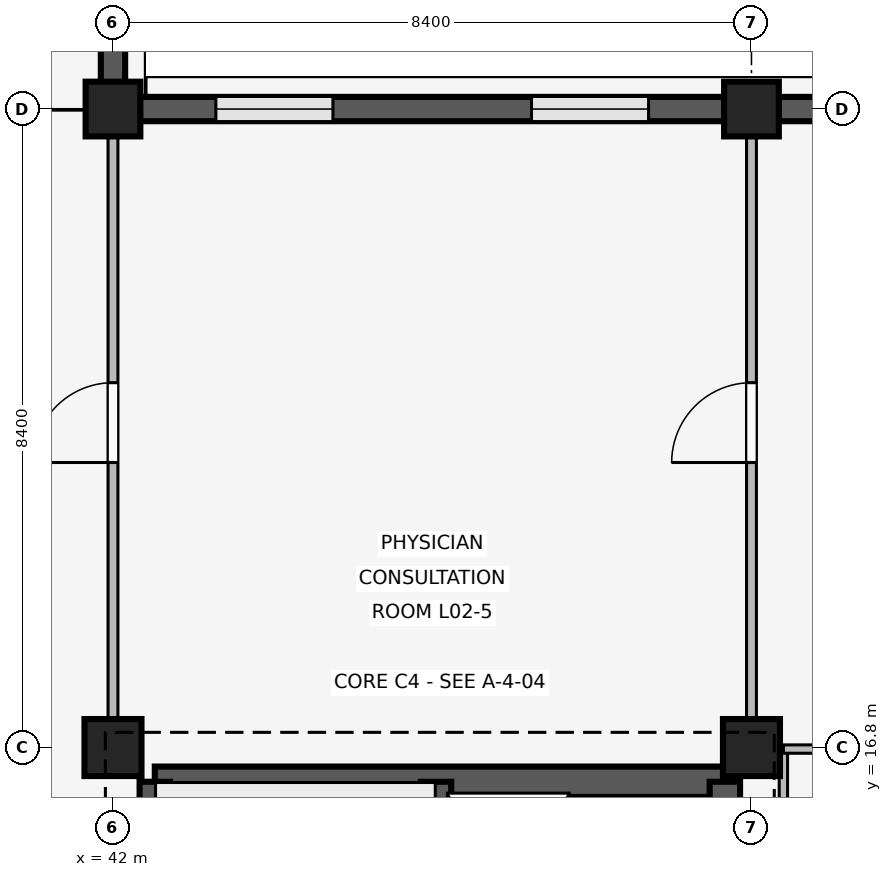
"""IFC4 building model, lengths in metres.
Left out: names, types, materials, properties, quantities, classifications, styles, units other than length and angle.
Written with IfcOpenShell. Run it as: python <this file> out.ifc"""

import sys

from ifc_helpers import new_model, si_unit, direction, frame, frame_2d, origin, origin_2d, place, context, subcontext, project, spatial, rectangle, extrude, element, fill, save


model = new_model("IFC4")
c1 = context("Model", 3, precision=1e-05, world=origin(), true_north=direction((0.0, 1.0)))
c2 = subcontext(c1, "Body", "Model", "MODEL_VIEW")
j1 = project(units=[si_unit("LENGTHUNIT", "METRE"), si_unit("PLANEANGLEUNIT", "RADIAN")], contexts=[c1])
p1 = place(None, origin())
s1 = spatial("IfcSite", under=j1, at=p1, CompositionType="ELEMENT")
p2 = place(p1, origin())
s2 = spatial("IfcBuilding", under=s1, at=p2, CompositionType="ELEMENT")
p3 = place(p2, frame((0.0, 0.0, 8.1)))
s3 = spatial("IfcBuildingStorey", under=s2, at=p3, CompositionType="ELEMENT", Elevation=8.1)
p4 = place(p3, frame((42.0, 16.8, 0.0), z_axis=(0.0, 0.0, 1.0), x_axis=(1.0, 0.0, 0.0)))
e1 = element("IfcColumn", 1, at=p4, inside=s3, PredefinedType="COLUMN", context=c2, shape_type="SweptSolid", body=[
    extrude(rectangle(XDim=0.75, YDim=0.75, at=origin_2d()), origin(), (0.0, 0.0, 1.0), 4.8),
])
p5 = place(p3, frame((42.0, 25.2, 0.0), z_axis=(0.0, 0.0, 1.0), x_axis=(1.0, 0.0, 0.0)))
e2 = element("IfcColumn", 2, at=p5, inside=s3, PredefinedType="COLUMN", context=c2, shape_type="SweptSolid", body=[
    extrude(rectangle(XDim=0.72, YDim=0.72, at=origin_2d()), origin(), (0.0, 0.0, 1.0), 4.8),
])
p6 = place(p3, frame((50.4, 16.8, 0.0), z_axis=(0.0, 0.0, 1.0), x_axis=(1.0, 0.0, 0.0)))
e3 = element("IfcColumn", 3, at=p6, inside=s3, PredefinedType="COLUMN", context=c2, shape_type="SweptSolid", body=[
    extrude(rectangle(XDim=0.75, YDim=0.75, at=origin_2d()), origin(), (0.0, 0.0, 1.0), 4.8),
])
p7 = place(p3, frame((50.4, 25.2, 0.0), z_axis=(0.0, 0.0, 1.0), x_axis=(1.0, 0.0, 0.0)))
e4 = element("IfcColumn", 4, at=p7, inside=s3, PredefinedType="COLUMN", context=c2, shape_type="SweptSolid", body=[
    extrude(rectangle(XDim=0.72, YDim=0.72, at=origin_2d()), origin(), (0.0, 0.0, 1.0), 4.8),
])
p8 = place(p3, frame((42.0, 33.245, 0.0), z_axis=(0.0, 0.0, 1.0), x_axis=(0.0, -1.0, 0.0)))
e5 = element("IfcWall", 5, at=p8, inside=s3, PredefinedType="SOLIDWALL", context=c2, shape_type="SweptSolid", body=[
    extrude(rectangle(XDim=7.69, YDim=0.32, at=frame_2d((3.845, 0.0))), origin(), (0.0, 0.0, 1.0), 3.86),
])
p9 = place(p8, frame((1.079, 0.0, 0.85)))
e6 = element("IfcOpeningElement", 6, at=p9, cuts=e5, PredefinedType="OPENING", context=c2, shape_type="SweptSolid", body=[
    extrude(rectangle(XDim=1.38, YDim=1.5, at=frame_2d((0.69, 0.75))), frame((0.0, 0.17, 0.0), z_axis=(0.0, -1.0, 0.0), x_axis=(1.0, 0.0, 0.0)), (0.0, 0.0, 1.0), 0.34),
])
p10 = place(p8, frame((5.231, 0.0, 0.85)))
e7 = element("IfcOpeningElement", 7, at=p10, cuts=e5, PredefinedType="OPENING", context=c2, shape_type="SweptSolid", body=[
    extrude(rectangle(XDim=1.38, YDim=1.5, at=frame_2d((0.69, 0.75))), frame((0.0, 0.17, 0.0), z_axis=(0.0, -1.0, 0.0), x_axis=(1.0, 0.0, 0.0)), (0.0, 0.0, 1.0), 0.34),
])
p11 = place(p3, frame((42.355, 25.2, 0.0), z_axis=(0.0, 0.0, 1.0), x_axis=(1.0, 0.0, 0.0)))
e8 = element("IfcWall", 8, at=p11, inside=s3, PredefinedType="SOLIDWALL", context=c2, shape_type="SweptSolid", body=[
    extrude(rectangle(XDim=7.69, YDim=0.32, at=frame_2d((3.845, 0.0))), origin(), (0.0, 0.0, 1.0), 3.86),
])
p12 = place(p11, frame((0.999, 0.0, 0.85)))
e9 = element("IfcOpeningElement", 9, at=p12, cuts=e8, PredefinedType="OPENING", context=c2, shape_type="SweptSolid", body=[
    extrude(rectangle(XDim=1.54, YDim=1.85, at=frame_2d((0.77, 0.925))), frame((0.0, 0.17, 0.0), z_axis=(0.0, -1.0, 0.0), x_axis=(1.0, 0.0, 0.0)), (0.0, 0.0, 1.0), 0.34),
])
p13 = place(p11, frame((5.151, 0.0, 0.85)))
e10 = element("IfcOpeningElement", 10, at=p13, cuts=e8, PredefinedType="OPENING", context=c2, shape_type="SweptSolid", body=[
    extrude(rectangle(XDim=1.54, YDim=1.85, at=frame_2d((0.77, 0.925))), frame((0.0, 0.17, 0.0), z_axis=(0.0, -1.0, 0.0), x_axis=(1.0, 0.0, 0.0)), (0.0, 0.0, 1.0), 0.34),
])
p14 = place(p3, frame((50.755, 25.2, 0.0), z_axis=(0.0, 0.0, 1.0), x_axis=(1.0, 0.0, 0.0)))
e11 = element("IfcWall", 11, at=p14, inside=s3, PredefinedType="SOLIDWALL", context=c2, shape_type="SweptSolid", body=[
    extrude(rectangle(XDim=7.69, YDim=0.32, at=frame_2d((3.845, 0.0))), origin(), (0.0, 0.0, 1.0), 3.86),
])
p15 = place(p14, frame((0.929, 0.0, 0.85)))
e12 = element("IfcOpeningElement", 12, at=p15, cuts=e11, PredefinedType="OPENING", context=c2, shape_type="SweptSolid", body=[
    extrude(rectangle(XDim=1.68, YDim=2.05, at=frame_2d((0.84, 1.025))), frame((0.0, 0.17, 0.0), z_axis=(0.0, -1.0, 0.0), x_axis=(1.0, 0.0, 0.0)), (0.0, 0.0, 1.0), 0.34),
])
p16 = place(p14, frame((5.081, 0.0, 0.85)))
e13 = element("IfcOpeningElement", 13, at=p16, cuts=e11, PredefinedType="OPENING", context=c2, shape_type="SweptSolid", body=[
    extrude(rectangle(XDim=1.68, YDim=2.05, at=frame_2d((0.84, 1.025))), frame((0.0, 0.17, 0.0), z_axis=(0.0, -1.0, 0.0), x_axis=(1.0, 0.0, 0.0)), (0.0, 0.0, 1.0), 0.34),
])
p17 = place(p3, frame((42.55, 16.35, 0.0), z_axis=(0.0, 0.0, 1.0), x_axis=(1.0, 0.0, 0.0)))
e14 = element("IfcWall", 14, at=p17, inside=s3, PredefinedType="SHEAR", context=c2, shape_type="SweptSolid", body=[
    extrude(rectangle(XDim=7.5, YDim=0.4, at=frame_2d((3.75, 0.0))), origin(), (0.0, 0.0, 1.0), 4.52),
])
p18 = place(p3, frame((42.55, 8.8, 0.0), z_axis=(0.0, 0.0, 1.0), x_axis=(0.0, 1.0, 0.0)))
e15 = element("IfcWall", 15, at=p18, inside=s3, PredefinedType="SHEAR", context=c2, shape_type="SweptSolid", body=[
    extrude(rectangle(XDim=7.55, YDim=0.4, at=frame_2d((3.775, 0.0))), origin(), (0.0, 0.0, 1.0), 4.52),
])
p19 = place(p18, frame((0.28, 0.0, 0.0)))
e16 = element("IfcOpeningElement", 16, at=p19, cuts=e15, PredefinedType="OPENING", context=c2, shape_type="SweptSolid", body=[
    extrude(rectangle(XDim=1.0, YDim=2.15, at=frame_2d((0.5, 1.075))), frame((0.0, 0.21, 0.0), z_axis=(0.0, -1.0, 0.0), x_axis=(1.0, 0.0, 0.0)), (0.0, 0.0, 1.0), 0.42),
])
p20 = place(p3, frame((50.05, 8.8, 0.0), z_axis=(0.0, 0.0, 1.0), x_axis=(0.0, 1.0, 0.0)))
e17 = element("IfcWall", 17, at=p20, inside=s3, PredefinedType="SHEAR", context=c2, shape_type="SweptSolid", body=[
    extrude(rectangle(XDim=7.55, YDim=0.4, at=frame_2d((3.775, 0.0))), origin(), (0.0, 0.0, 1.0), 4.52),
])
p21 = place(p20, frame((2.4, 0.0, 0.0)))
e18 = element("IfcOpeningElement", 18, at=p21, cuts=e17, PredefinedType="OPENING", context=c2, shape_type="SweptSolid", body=[
    extrude(rectangle(XDim=1.2, YDim=2.2, at=frame_2d((0.6, 1.1))), frame((0.0, 0.21, 0.0), z_axis=(0.0, -1.0, 0.0), x_axis=(1.0, 0.0, 0.0)), (0.0, 0.0, 1.0), 0.42),
])
p22 = place(p3, frame((46.25, 8.8, 0.0), z_axis=(0.0, 0.0, 1.0), x_axis=(0.0, 1.0, 0.0)))
e19 = element("IfcWall", 19, at=p22, inside=s3, PredefinedType="SHEAR", context=c2, shape_type="SweptSolid", body=[
    extrude(rectangle(XDim=7.55, YDim=0.4, at=frame_2d((3.775, 0.0))), origin(), (0.0, 0.0, 1.0), 4.52),
])
p23 = place(p22, frame((0.28, 0.0, 0.0)))
e20 = element("IfcOpeningElement", 20, at=p23, cuts=e19, PredefinedType="OPENING", context=c2, shape_type="SweptSolid", body=[
    extrude(rectangle(XDim=1.0, YDim=2.15, at=frame_2d((0.5, 1.075))), frame((0.0, 0.21, 0.0), z_axis=(0.0, -1.0, 0.0), x_axis=(1.0, 0.0, 0.0)), (0.0, 0.0, 1.0), 0.42),
])
p24 = place(p3, frame((42.0, 17.15, 0.0), z_axis=(0.0, 0.0, 1.0), x_axis=(0.0, 1.0, 0.0)))
e21 = element("IfcWall", 21, at=p24, inside=s3, PredefinedType="PARTITIONING", context=c2, shape_type="SweptSolid", body=[
    extrude(rectangle(XDim=7.91, YDim=0.13, at=frame_2d((3.955, 0.0))), origin(), (0.0, 0.0, 1.0), 3.84),
])
p25 = place(p24, frame((3.4, 0.0, 0.0)))
e22 = element("IfcOpeningElement", 22, at=p25, cuts=e21, PredefinedType="OPENING", context=c2, shape_type="SweptSolid", body=[
    extrude(rectangle(XDim=1.05, YDim=2.2, at=frame_2d((0.525, 1.1))), frame((0.0, 0.075, 0.0), z_axis=(0.0, -1.0, 0.0), x_axis=(1.0, 0.0, 0.0)), (0.0, 0.0, 1.0), 0.15),
])
p26 = place(p3, frame((50.4, 17.15, 0.0), z_axis=(0.0, 0.0, 1.0), x_axis=(0.0, 1.0, 0.0)))
e23 = element("IfcWall", 23, at=p26, inside=s3, PredefinedType="PARTITIONING", context=c2, shape_type="SweptSolid", body=[
    extrude(rectangle(XDim=7.91, YDim=0.13, at=frame_2d((3.955, 0.0))), origin(), (0.0, 0.0, 1.0), 3.84),
])
p27 = place(p26, frame((3.4, 0.0, 0.0)))
e24 = element("IfcOpeningElement", 24, at=p27, cuts=e23, PredefinedType="OPENING", context=c2, shape_type="SweptSolid", body=[
    extrude(rectangle(XDim=1.05, YDim=2.2, at=frame_2d((0.525, 1.1))), frame((0.0, 0.075, 0.0), z_axis=(0.0, -1.0, 0.0), x_axis=(1.0, 0.0, 0.0)), (0.0, 0.0, 1.0), 0.15),
])
p28 = place(p3, frame((50.82, 14.17, 0.0), z_axis=(0.0, 0.0, 1.0), x_axis=(0.0, 1.0, 0.0)))
e25 = element("IfcWall", 25, at=p28, inside=s3, PredefinedType="PARTITIONING", context=c2, shape_type="SweptSolid", body=[
    extrude(rectangle(XDim=2.61, YDim=0.11, at=frame_2d((1.305, 0.0))), origin(), (0.0, 0.0, 1.0), 3.84),
])
p29 = place(p3, frame((50.82, 16.78, 0.0), z_axis=(0.0, 0.0, 1.0), x_axis=(1.0, 0.0, 0.0)))
e26 = element("IfcWall", 26, at=p29, inside=s3, PredefinedType="PARTITIONING", context=c2, shape_type="SweptSolid", body=[
    extrude(rectangle(XDim=1.98, YDim=0.11, at=frame_2d((0.99, 0.0))), origin(), (0.0, 0.0, 1.0), 3.84),
])
p30 = place(p29, frame((0.54, 0.0, 0.0)))
e27 = element("IfcOpeningElement", 27, at=p30, cuts=e26, PredefinedType="OPENING", context=c2, shape_type="SweptSolid", body=[
    extrude(rectangle(XDim=0.9, YDim=2.1, at=frame_2d((0.45, 1.05))), frame((0.0, 0.065, 0.0), z_axis=(0.0, -1.0, 0.0), x_axis=(1.0, 0.0, 0.0)), (0.0, 0.0, 1.0), 0.13),
])
p31 = place(p12, origin())
e28 = element("IfcWindow", 28, at=p31, inside=s3, PartitioningType="SINGLE_PANEL", PredefinedType="WINDOW", context=c2, shape_type="SweptSolid", body=[
    extrude(rectangle(XDim=1.54, YDim=1.85, at=frame_2d((0.77, 0.925))), frame((0.0, 0.03, 0.0), z_axis=(0.0, -1.0, 0.0), x_axis=(1.0, 0.0, 0.0)), (0.0, 0.0, 1.0), 0.06),
])
fill(e9, e28)
p32 = place(p13, origin())
e29 = element("IfcWindow", 29, at=p32, inside=s3, PartitioningType="SINGLE_PANEL", PredefinedType="WINDOW", context=c2, shape_type="SweptSolid", body=[
    extrude(rectangle(XDim=1.54, YDim=1.85, at=frame_2d((0.77, 0.925))), frame((0.0, 0.03, 0.0), z_axis=(0.0, -1.0, 0.0), x_axis=(1.0, 0.0, 0.0)), (0.0, 0.0, 1.0), 0.06),
])
fill(e10, e29)
p33 = place(p25, origin())
e30 = element("IfcDoor", 30, at=p33, inside=s3, OperationType="SINGLE_SWING_LEFT", PredefinedType="DOOR", context=c2, shape_type="SweptSolid", body=[
    extrude(rectangle(XDim=1.05, YDim=2.2, at=frame_2d((0.525, 1.1))), frame((0.0, 0.025, 0.0), z_axis=(0.0, -1.0, 0.0), x_axis=(1.0, 0.0, 0.0)), (0.0, 0.0, 1.0), 0.05),
])
fill(e22, e30)
p34 = place(p27, origin())
e31 = element("IfcDoor", 31, at=p34, inside=s3, OperationType="SINGLE_SWING_LEFT", PredefinedType="DOOR", context=c2, shape_type="SweptSolid", body=[
    extrude(rectangle(XDim=1.05, YDim=2.2, at=frame_2d((0.525, 1.1))), frame((0.0, 0.025, 0.0), z_axis=(0.0, -1.0, 0.0), x_axis=(1.0, 0.0, 0.0)), (0.0, 0.0, 1.0), 0.05),
])
fill(e24, e31)
save(model, sys.argv[1])
